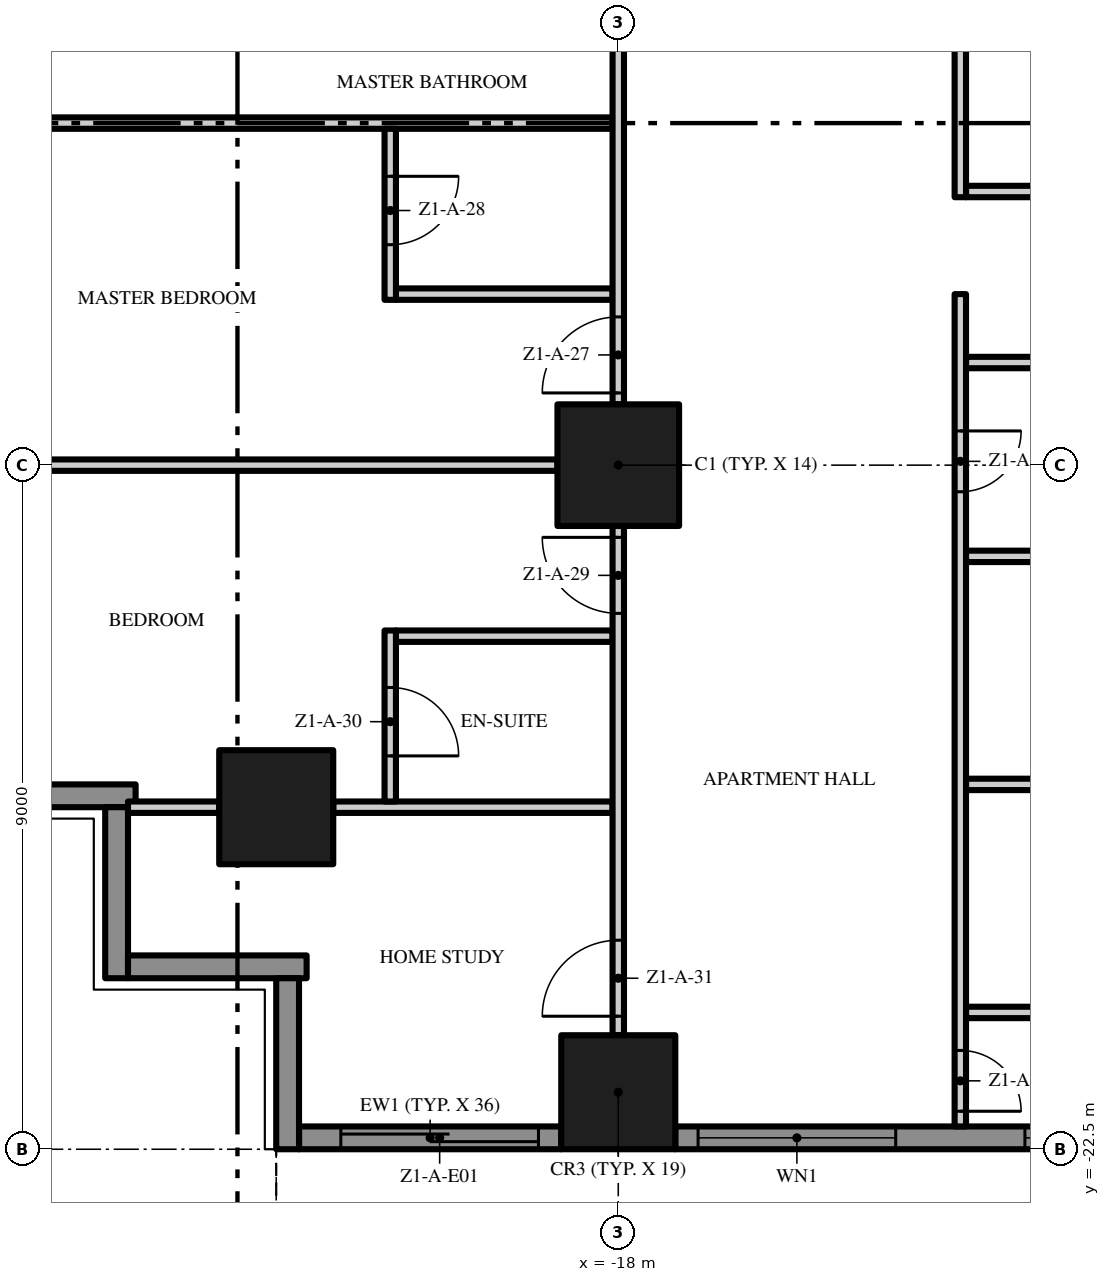
"""IFC4 building model, lengths in metres.
Left out: names, types, materials, properties, quantities, classifications, styles, units other than length and angle.
Written with IfcOpenShell. Run it as: python <this file> out.ifc"""

import sys

from ifc_helpers import new_model, si_unit, direction, frame, frame_2d, origin, origin_2d, place, context, subcontext, project, spatial, polyline, rectangle, outline, extrude, element, fill, save


model = new_model("IFC4")
c1 = context("Model", 3, precision=1e-05, world=origin(), true_north=direction((0.0, 1.0)))
c2 = subcontext(c1, "Body", "Model", "MODEL_VIEW")
j1 = project(units=[si_unit("LENGTHUNIT", "METRE"), si_unit("PLANEANGLEUNIT", "RADIAN")], contexts=[c1])
p1 = place(None, origin())
s1 = spatial("IfcSite", under=j1, at=p1, CompositionType="ELEMENT")
p2 = place(p1, origin())
s2 = spatial("IfcBuilding", under=s1, at=p2, CompositionType="ELEMENT")
p3 = place(p2, frame((0.0, 0.0, 15.0)))
s3 = spatial("IfcBuildingStorey", under=s2, at=p3, CompositionType="ELEMENT", Elevation=15.0)
p4 = place(p3, frame((-18.0, -13.5, 0.0), z_axis=(0.0, 0.0, 1.0), x_axis=(1.0, 0.0, 0.0)))
e1 = element("IfcColumn", 1, at=p4, inside=s3, PredefinedType="COLUMN", context=c2, shape_type="SweptSolid", body=[
    extrude(rectangle(XDim=1.6, YDim=1.6, at=origin_2d()), origin(), (0.0, 0.0, 1.0), 3.5),
])
for number, where, z_axis, x_axis in (
    (2, (-18.0, -21.75, 0.0), (0.0, 0.0, 1.0), (1.0, 0.0, 0.0)),
    (3, (-22.5, -18.0, 0.0), (0.0, 0.0, 1.0), (1.0, 0.0, 0.0)),
):
    element("IfcColumn", number, at=place(p3, frame(where, z_axis=z_axis, x_axis=x_axis)), inside=s3, PredefinedType="COLUMN", context=c2, shape_type="SweptSolid", body=[
        extrude(rectangle(XDim=1.5, YDim=1.5, at=origin_2d()), origin(), (0.0, 0.0, 1.0), 3.5),
    ])
p5 = place(p3, frame((-18.75, -22.35, 0.0), z_axis=(0.0, 0.0, 1.0), x_axis=(-1.0, 0.0, 0.0)))
e4 = element("IfcWall", 4, at=p5, inside=s3, PredefinedType="SOLIDWALL", context=c2, shape_type="SweptSolid", body=[
    extrude(rectangle(XDim=3.45, YDim=0.3, at=frame_2d((1.725, 0.0))), origin(), (0.0, 0.0, 1.0), 3.5),
])
p6 = place(p5, frame((0.3, 0.0, 0.0)))
e5 = element("IfcOpeningElement", 5, at=p6, cuts=e4, PredefinedType="OPENING", context=c2, shape_type="SweptSolid", body=[
    extrude(rectangle(XDim=2.6, YDim=2.4, at=frame_2d((1.3, 1.2))), frame((0.0, 0.16, 0.0), z_axis=(0.0, -1.0, 0.0), x_axis=(1.0, 0.0, 0.0)), (0.0, 0.0, 1.0), 0.32),
])
p7 = place(p3, frame((-9.75, -22.35, 0.0), z_axis=(0.0, 0.0, 1.0), x_axis=(-1.0, 0.0, 0.0)))
e6 = element("IfcWall", 6, at=p7, inside=s3, PredefinedType="SOLIDWALL", context=c2, shape_type="SweptSolid", body=[
    extrude(rectangle(XDim=7.5, YDim=0.3, at=frame_2d((3.75, 0.0))), origin(), (0.0, 0.0, 1.0), 3.5),
])
p8 = place(p7, frame((4.6, 0.0, 0.45)))
e7 = element("IfcOpeningElement", 7, at=p8, cuts=e6, PredefinedType="OPENING", context=c2, shape_type="SweptSolid", body=[
    extrude(rectangle(XDim=2.6, YDim=2.65, at=frame_2d((1.3, 1.325))), frame((0.0, 0.16, 0.0), z_axis=(0.0, -1.0, 0.0), x_axis=(1.0, 0.0, 0.0)), (0.0, 0.0, 1.0), 0.32),
])
p9 = place(p7, frame((0.3, 0.0, 0.45)))
e8 = element("IfcOpeningElement", 8, at=p9, cuts=e6, PredefinedType="OPENING", context=c2, shape_type="SweptSolid", body=[
    extrude(rectangle(XDim=2.6, YDim=2.65, at=frame_2d((1.3, 1.325))), frame((0.0, 0.16, 0.0), z_axis=(0.0, -1.0, 0.0), x_axis=(1.0, 0.0, 0.0)), (0.0, 0.0, 1.0), 0.32),
])
p10 = place(p3, frame((-24.35, -17.85, 0.0), z_axis=(0.0, 0.0, 1.0), x_axis=(-1.0, 0.0, 0.0)))
e9 = element("IfcWall", 9, at=p10, inside=s3, PredefinedType="SOLIDWALL", context=c2, shape_type="SweptSolid", body=[
    extrude(rectangle(XDim=2.35, YDim=0.3, at=frame_2d((1.175, 0.0))), origin(), (0.0, 0.0, 1.0), 3.5),
])
p11 = place(p3, frame((-24.6, -20.25, 0.0), z_axis=(0.0, 0.0, 1.0), x_axis=(0.0, 1.0, 0.0)))
e10 = element("IfcWall", 10, at=p11, inside=s3, PredefinedType="SOLIDWALL", context=c2, shape_type="SweptSolid", body=[
    extrude(rectangle(XDim=2.25, YDim=0.3, at=frame_2d((1.125, 0.0))), origin(), (0.0, 0.0, 1.0), 3.5),
])
p12 = place(p3, frame((-22.1, -20.1, 0.0), z_axis=(0.0, 0.0, 1.0), x_axis=(-1.0, 0.0, 0.0)))
e11 = element("IfcWall", 11, at=p12, inside=s3, PredefinedType="SOLIDWALL", context=c2, shape_type="SweptSolid", body=[
    extrude(rectangle(XDim=2.35, YDim=0.3, at=frame_2d((1.175, 0.0))), origin(), (0.0, 0.0, 1.0), 3.5),
])
p13 = place(p3, frame((-22.35, -22.5, 0.0), z_axis=(0.0, 0.0, 1.0), x_axis=(0.0, 1.0, 0.0)))
e12 = element("IfcWall", 12, at=p13, inside=s3, PredefinedType="SOLIDWALL", context=c2, shape_type="SweptSolid", body=[
    extrude(rectangle(XDim=2.25, YDim=0.3, at=frame_2d((1.125, 0.0))), origin(), (0.0, 0.0, 1.0), 3.5),
])
p14 = place(p3, origin())
e13 = element("IfcWall", 13, at=p14, inside=s3, PredefinedType="USERDEFINED", context=c2, shape_type="SweptSolid", body=[
    extrude(outline(polyline([(-22.5, -24.3), (-21.0, -25.005), (-19.5, -25.441), (-18.75, -25.5), (-18.0, -25.441), (-16.5, -25.005), (-15.0, -24.3), (-13.5, -23.595), (-12.0, -23.159), (-11.25, -23.1), (-10.5, -23.159), (-9.0, -23.595), (-7.5, -24.3), (-6.0, -25.005), (-4.5, -25.441), (-3.75, -25.5), (-3.0, -25.441), (-1.5, -25.005), (0.0, -24.3), (1.5, -23.595), (3.0, -23.159), (3.75, -23.1), (4.5, -23.159), (6.0, -23.595), (7.5, -24.3), (9.0, -25.005), (10.5, -25.441), (11.25, -25.5), (12.0, -25.441), (13.5, -25.005), (15.0, -24.3), (16.5, -23.595), (18.0, -23.159), (18.75, -23.1), (19.5, -23.159), (21.0, -23.595), (22.5, -24.3), (22.606, -24.074), (21.089, -23.36), (19.545, -22.911), (18.75, -22.849), (17.955, -22.911), (16.411, -23.36), (14.894, -24.074), (13.411, -24.771), (11.955, -25.194), (11.25, -25.249), (10.545, -25.194), (9.089, -24.771), (7.606, -24.074), (6.089, -23.36), (4.545, -22.911), (3.75, -22.849), (2.955, -22.911), (1.411, -23.36), (-0.106, -24.074), (-1.589, -24.771), (-3.045, -25.194), (-3.75, -25.249), (-4.455, -25.194), (-5.911, -24.771), (-7.394, -24.074), (-8.911, -23.36), (-10.455, -22.911), (-11.25, -22.849), (-12.045, -22.911), (-13.589, -23.36), (-15.106, -24.074), (-16.589, -24.771), (-18.045, -25.194), (-18.75, -25.249), (-19.455, -25.194), (-20.911, -24.771), (-22.394, -24.074), (-22.5, -24.3)])), origin(), (0.0, 0.0, 1.0), 0.9),
])
p15 = place(p3, frame((-13.425, -20.7, 0.0), z_axis=(0.0, 0.0, 1.0), x_axis=(1.0, 0.0, 0.0)))
e14 = element("IfcWall", 14, at=p15, inside=s3, PredefinedType="PARTITIONING", context=c2, shape_type="SweptSolid", body=[
    extrude(rectangle(XDim=4.35, YDim=0.15, at=frame_2d((2.175, 0.0))), origin(), (0.0, 0.0, 1.0), 3.5),
])
p16 = place(p3, frame((-24.45, -18.0, 0.0), z_axis=(0.0, 0.0, 1.0), x_axis=(1.0, 0.0, 0.0)))
e15 = element("IfcWall", 15, at=p16, inside=s3, PredefinedType="PARTITIONING", context=c2, shape_type="SweptSolid", body=[
    extrude(rectangle(XDim=1.2, YDim=0.15, at=frame_2d((0.6, 0.0))), origin(), (0.0, 0.0, 1.0), 3.5),
])
p17 = place(p3, frame((-21.75, -18.0, 0.0), z_axis=(0.0, 0.0, 1.0), x_axis=(1.0, 0.0, 0.0)))
e16 = element("IfcWall", 16, at=p17, inside=s3, PredefinedType="PARTITIONING", context=c2, shape_type="SweptSolid", body=[
    extrude(rectangle(XDim=3.675, YDim=0.15, at=frame_2d((1.837, 0.0))), origin(), (0.0, 0.0, 1.0), 3.5),
])
p18 = place(p3, frame((-13.425, -17.7, 0.0), z_axis=(0.0, 0.0, 1.0), x_axis=(1.0, 0.0, 0.0)))
e17 = element("IfcWall", 17, at=p18, inside=s3, PredefinedType="PARTITIONING", context=c2, shape_type="SweptSolid", body=[
    extrude(rectangle(XDim=4.35, YDim=0.15, at=frame_2d((2.175, 0.0))), origin(), (0.0, 0.0, 1.0), 3.5),
])
p19 = place(p3, frame((-20.925, -15.75, 0.0), z_axis=(0.0, 0.0, 1.0), x_axis=(1.0, 0.0, 0.0)))
e18 = element("IfcWall", 18, at=p19, inside=s3, PredefinedType="PARTITIONING", context=c2, shape_type="SweptSolid", body=[
    extrude(rectangle(XDim=2.85, YDim=0.15, at=frame_2d((1.425, 0.0))), origin(), (0.0, 0.0, 1.0), 3.5),
])
p20 = place(p3, frame((-13.425, -14.7, 0.0), z_axis=(0.0, 0.0, 1.0), x_axis=(1.0, 0.0, 0.0)))
e19 = element("IfcWall", 19, at=p20, inside=s3, PredefinedType="PARTITIONING", context=c2, shape_type="SweptSolid", body=[
    extrude(rectangle(XDim=4.35, YDim=0.15, at=frame_2d((2.175, 0.0))), origin(), (0.0, 0.0, 1.0), 3.5),
])
p21 = place(p3, frame((-25.5, -13.5, 0.0), z_axis=(0.0, 0.0, 1.0), x_axis=(1.0, 0.0, 0.0)))
e20 = element("IfcWall", 20, at=p21, inside=s3, PredefinedType="PARTITIONING", context=c2, shape_type="SweptSolid", body=[
    extrude(rectangle(XDim=6.7, YDim=0.15, at=frame_2d((3.35, 0.0))), origin(), (0.0, 0.0, 1.0), 3.5),
])
p22 = place(p3, frame((-13.425, -12.15, 0.0), z_axis=(0.0, 0.0, 1.0), x_axis=(1.0, 0.0, 0.0)))
e21 = element("IfcWall", 21, at=p22, inside=s3, PredefinedType="PARTITIONING", context=c2, shape_type="SweptSolid", body=[
    extrude(rectangle(XDim=4.35, YDim=0.15, at=frame_2d((2.175, 0.0))), origin(), (0.0, 0.0, 1.0), 3.5),
])
p23 = place(p3, frame((-20.925, -11.25, 0.0), z_axis=(0.0, 0.0, 1.0), x_axis=(1.0, 0.0, 0.0)))
e22 = element("IfcWall", 22, at=p23, inside=s3, PredefinedType="PARTITIONING", context=c2, shape_type="SweptSolid", body=[
    extrude(rectangle(XDim=2.85, YDim=0.15, at=frame_2d((1.425, 0.0))), origin(), (0.0, 0.0, 1.0), 3.5),
])
p24 = place(p3, frame((-13.425, -9.9, 0.0), z_axis=(0.0, 0.0, 1.0), x_axis=(1.0, 0.0, 0.0)))
e23 = element("IfcWall", 23, at=p24, inside=s3, PredefinedType="PARTITIONING", context=c2, shape_type="SweptSolid", body=[
    extrude(rectangle(XDim=4.35, YDim=0.15, at=frame_2d((2.175, 0.0))), origin(), (0.0, 0.0, 1.0), 3.5),
])
p25 = place(p24, frame((1.75, 0.0, 0.0)))
e24 = element("IfcOpeningElement", 24, at=p25, cuts=e23, PredefinedType="OPENING", context=c2, shape_type="SweptSolid", body=[
    extrude(rectangle(XDim=0.9, YDim=2.1, at=frame_2d((0.45, 1.05))), frame((0.0, 0.085, 0.0), z_axis=(0.0, -1.0, 0.0), x_axis=(1.0, 0.0, 0.0)), (0.0, 0.0, 1.0), 0.17),
])
p26 = place(p3, frame((-26.7, -9.0, 0.0), z_axis=(0.0, 0.0, 1.0), x_axis=(1.0, 0.0, 0.0)))
e25 = element("IfcWall", 25, at=p26, inside=s3, PredefinedType="PARTITIONING", context=c2, shape_type="SweptSolid", body=[
    extrude(rectangle(XDim=8.625, YDim=0.15, at=frame_2d((4.312, 0.0))), origin(), (0.0, 0.0, 1.0), 3.5),
])
p27 = place(p3, frame((-21.0, -15.675, 0.0), z_axis=(0.0, 0.0, 1.0), x_axis=(0.0, -1.0, 0.0)))
e26 = element("IfcWall", 26, at=p27, inside=s3, PredefinedType="PARTITIONING", context=c2, shape_type="SweptSolid", body=[
    extrude(rectangle(XDim=2.25, YDim=0.15, at=frame_2d((1.125, 0.0))), origin(), (0.0, 0.0, 1.0), 3.5),
])
p28 = place(p27, frame((0.75, 0.0, 0.0)))
e27 = element("IfcOpeningElement", 27, at=p28, cuts=e26, PredefinedType="OPENING", context=c2, shape_type="SweptSolid", body=[
    extrude(rectangle(XDim=0.9, YDim=2.1, at=frame_2d((0.45, 1.05))), frame((0.0, 0.085, 0.0), z_axis=(0.0, -1.0, 0.0), x_axis=(1.0, 0.0, 0.0)), (0.0, 0.0, 1.0), 0.17),
])
p29 = place(p3, frame((-21.0, -9.075, 0.0), z_axis=(0.0, 0.0, 1.0), x_axis=(0.0, -1.0, 0.0)))
e28 = element("IfcWall", 28, at=p29, inside=s3, PredefinedType="PARTITIONING", context=c2, shape_type="SweptSolid", body=[
    extrude(rectangle(XDim=2.25, YDim=0.15, at=frame_2d((1.125, 0.0))), origin(), (0.0, 0.0, 1.0), 3.5),
])
p30 = place(p29, frame((0.625, 0.0, 0.0)))
e29 = element("IfcOpeningElement", 29, at=p30, cuts=e28, PredefinedType="OPENING", context=c2, shape_type="SweptSolid", body=[
    extrude(rectangle(XDim=0.9, YDim=2.1, at=frame_2d((0.45, 1.05))), frame((0.0, 0.085, 0.0), z_axis=(0.0, -1.0, 0.0), x_axis=(1.0, 0.0, 0.0)), (0.0, 0.0, 1.0), 0.17),
])
p31 = place(p3, frame((-18.0, -21.0, 0.0), z_axis=(0.0, 0.0, 1.0), x_axis=(0.0, 1.0, 0.0)))
e30 = element("IfcWall", 30, at=p31, inside=s3, PredefinedType="PARTITIONING", context=c2, shape_type="SweptSolid", body=[
    extrude(rectangle(XDim=6.7, YDim=0.15, at=frame_2d((3.35, 0.0))), origin(), (0.0, 0.0, 1.0), 3.5),
])
p32 = place(p31, frame((5.55, 0.0, 0.0)))
e31 = element("IfcOpeningElement", 31, at=p32, cuts=e30, PredefinedType="OPENING", context=c2, shape_type="SweptSolid", body=[
    extrude(rectangle(XDim=1.0, YDim=2.4, at=frame_2d((0.5, 1.2))), frame((0.0, 0.085, 0.0), z_axis=(0.0, -1.0, 0.0), x_axis=(1.0, 0.0, 0.0)), (0.0, 0.0, 1.0), 0.17),
])
p33 = place(p31, frame((0.25, 0.0, 0.0)))
e32 = element("IfcOpeningElement", 32, at=p33, cuts=e30, PredefinedType="OPENING", context=c2, shape_type="SweptSolid", body=[
    extrude(rectangle(XDim=1.0, YDim=2.4, at=frame_2d((0.5, 1.2))), frame((0.0, 0.085, 0.0), z_axis=(0.0, -1.0, 0.0), x_axis=(1.0, 0.0, 0.0)), (0.0, 0.0, 1.0), 0.17),
])
p34 = place(p3, frame((-18.0, -12.7, 0.0), z_axis=(0.0, 0.0, 1.0), x_axis=(0.0, 1.0, 0.0)))
e33 = element("IfcWall", 33, at=p34, inside=s3, PredefinedType="PARTITIONING", context=c2, shape_type="SweptSolid", body=[
    extrude(rectangle(XDim=7.4, YDim=0.15, at=frame_2d((3.7, 0.0))), origin(), (0.0, 0.0, 1.0), 3.5),
])
p35 = place(p34, frame((5.45, 0.0, 0.0)))
e34 = element("IfcOpeningElement", 34, at=p35, cuts=e33, PredefinedType="OPENING", context=c2, shape_type="SweptSolid", body=[
    extrude(rectangle(XDim=1.8, YDim=2.4, at=frame_2d((0.9, 1.2))), frame((0.0, 0.085, 0.0), z_axis=(0.0, -1.0, 0.0), x_axis=(1.0, 0.0, 0.0)), (0.0, 0.0, 1.0), 0.17),
])
p36 = place(p34, frame((0.15, 0.0, 0.0)))
e35 = element("IfcOpeningElement", 35, at=p36, cuts=e33, PredefinedType="OPENING", context=c2, shape_type="SweptSolid", body=[
    extrude(rectangle(XDim=1.0, YDim=2.4, at=frame_2d((0.5, 1.2))), frame((0.0, 0.085, 0.0), z_axis=(0.0, -1.0, 0.0), x_axis=(1.0, 0.0, 0.0)), (0.0, 0.0, 1.0), 0.17),
])
p37 = place(p3, frame((-13.5, -11.25, 0.0), z_axis=(0.0, 0.0, 1.0), x_axis=(0.0, -1.0, 0.0)))
e36 = element("IfcWall", 36, at=p37, inside=s3, PredefinedType="PARTITIONING", context=c2, shape_type="SweptSolid", body=[
    extrude(rectangle(XDim=10.95, YDim=0.15, at=frame_2d((5.475, 0.0))), origin(), (0.0, 0.0, 1.0), 3.5),
])
p38 = place(p37, frame((1.8, 0.0, 0.0)))
e37 = element("IfcOpeningElement", 37, at=p38, cuts=e36, PredefinedType="OPENING", context=c2, shape_type="SweptSolid", body=[
    extrude(rectangle(XDim=0.8, YDim=2.0, at=frame_2d((0.4, 1.0))), frame((0.0, 0.085, 0.0), z_axis=(0.0, -1.0, 0.0), x_axis=(1.0, 0.0, 0.0)), (0.0, 0.0, 1.0), 0.17),
])
p39 = place(p37, frame((9.95, 0.0, 0.0)))
e38 = element("IfcOpeningElement", 38, at=p39, cuts=e36, PredefinedType="OPENING", context=c2, shape_type="SweptSolid", body=[
    extrude(rectangle(XDim=0.8, YDim=2.0, at=frame_2d((0.4, 1.0))), frame((0.0, 0.085, 0.0), z_axis=(0.0, -1.0, 0.0), x_axis=(1.0, 0.0, 0.0)), (0.0, 0.0, 1.0), 0.17),
])
p40 = place(p3, frame((-13.5, -9.975, 0.0), z_axis=(0.0, 0.0, 1.0), x_axis=(0.0, 1.0, 0.0)))
e39 = element("IfcWall", 39, at=p40, inside=s3, PredefinedType="PARTITIONING", context=c2, shape_type="SweptSolid", body=[
    extrude(rectangle(XDim=9.875, YDim=0.15, at=frame_2d((4.938, 0.0))), origin(), (0.0, 0.0, 1.0), 3.5),
])
p41 = place(p6, origin())
e40 = element("IfcDoor", 40, at=p41, inside=s3, OperationType="SINGLE_SWING_LEFT", PredefinedType="DOOR", context=c2, shape_type="SweptSolid", body=[
    extrude(rectangle(XDim=2.6, YDim=2.4, at=frame_2d((1.3, 1.2))), frame((0.0, 0.025, 0.0), z_axis=(0.0, -1.0, 0.0), x_axis=(1.0, 0.0, 0.0)), (0.0, 0.0, 1.0), 0.05),
])
fill(e5, e40)
p42 = place(p8, origin())
e41 = element("IfcWindow", 41, at=p42, inside=s3, PartitioningType="SINGLE_PANEL", PredefinedType="WINDOW", context=c2, shape_type="SweptSolid", body=[
    extrude(rectangle(XDim=2.6, YDim=2.65, at=frame_2d((1.3, 1.325))), frame((0.0, 0.03, 0.0), z_axis=(0.0, -1.0, 0.0), x_axis=(1.0, 0.0, 0.0)), (0.0, 0.0, 1.0), 0.06),
])
fill(e7, e41)
p43 = place(p9, origin())
e42 = element("IfcWindow", 42, at=p43, inside=s3, PartitioningType="SINGLE_PANEL", PredefinedType="WINDOW", context=c2, shape_type="SweptSolid", body=[
    extrude(rectangle(XDim=2.6, YDim=2.65, at=frame_2d((1.3, 1.325))), frame((0.0, 0.03, 0.0), z_axis=(0.0, -1.0, 0.0), x_axis=(1.0, 0.0, 0.0)), (0.0, 0.0, 1.0), 0.06),
])
fill(e8, e42)
p44 = place(p38, origin())
e43 = element("IfcDoor", 43, at=p44, inside=s3, OperationType="SINGLE_SWING_LEFT", PredefinedType="DOOR", context=c2, shape_type="SweptSolid", body=[
    extrude(rectangle(XDim=0.8, YDim=2.0, at=frame_2d((0.4, 1.0))), frame((0.0, 0.025, 0.0), z_axis=(0.0, -1.0, 0.0), x_axis=(1.0, 0.0, 0.0)), (0.0, 0.0, 1.0), 0.05),
])
fill(e37, e43)
p45 = place(p39, origin())
e44 = element("IfcDoor", 44, at=p45, inside=s3, OperationType="SINGLE_SWING_RIGHT", PredefinedType="DOOR", context=c2, shape_type="SweptSolid", body=[
    extrude(rectangle(XDim=0.8, YDim=2.0, at=frame_2d((0.4, 1.0))), frame((0.0, 0.025, 0.0), z_axis=(0.0, -1.0, 0.0), x_axis=(1.0, 0.0, 0.0)), (0.0, 0.0, 1.0), 0.05),
])
fill(e38, e44)
p46 = place(p36, origin())
e45 = element("IfcDoor", 45, at=p46, inside=s3, OperationType="SINGLE_SWING_LEFT", PredefinedType="DOOR", context=c2, shape_type="SweptSolid", body=[
    extrude(rectangle(XDim=1.0, YDim=2.4, at=frame_2d((0.5, 1.2))), frame((0.0, 0.025, 0.0), z_axis=(0.0, -1.0, 0.0), x_axis=(1.0, 0.0, 0.0)), (0.0, 0.0, 1.0), 0.05),
])
fill(e35, e45)
p47 = place(p30, origin())
e46 = element("IfcDoor", 46, at=p47, inside=s3, OperationType="SINGLE_SWING_LEFT", PredefinedType="DOOR", context=c2, shape_type="SweptSolid", body=[
    extrude(rectangle(XDim=0.9, YDim=2.1, at=frame_2d((0.45, 1.05))), frame((0.0, 0.025, 0.0), z_axis=(0.0, -1.0, 0.0), x_axis=(1.0, 0.0, 0.0)), (0.0, 0.0, 1.0), 0.05),
])
fill(e29, e46)
p48 = place(p32, origin())
e47 = element("IfcDoor", 47, at=p48, inside=s3, OperationType="SINGLE_SWING_RIGHT", PredefinedType="DOOR", context=c2, shape_type="SweptSolid", body=[
    extrude(rectangle(XDim=1.0, YDim=2.4, at=frame_2d((0.5, 1.2))), frame((0.0, 0.025, 0.0), z_axis=(0.0, -1.0, 0.0), x_axis=(1.0, 0.0, 0.0)), (0.0, 0.0, 1.0), 0.05),
])
fill(e31, e47)
p49 = place(p28, origin())
e48 = element("IfcDoor", 48, at=p49, inside=s3, OperationType="SINGLE_SWING_RIGHT", PredefinedType="DOOR", context=c2, shape_type="SweptSolid", body=[
    extrude(rectangle(XDim=0.9, YDim=2.1, at=frame_2d((0.45, 1.05))), frame((0.0, 0.025, 0.0), z_axis=(0.0, -1.0, 0.0), x_axis=(1.0, 0.0, 0.0)), (0.0, 0.0, 1.0), 0.05),
])
fill(e27, e48)
p50 = place(p33, origin())
e49 = element("IfcDoor", 49, at=p50, inside=s3, OperationType="SINGLE_SWING_LEFT", PredefinedType="DOOR", context=c2, shape_type="SweptSolid", body=[
    extrude(rectangle(XDim=1.0, YDim=2.4, at=frame_2d((0.5, 1.2))), frame((0.0, 0.025, 0.0), z_axis=(0.0, -1.0, 0.0), x_axis=(1.0, 0.0, 0.0)), (0.0, 0.0, 1.0), 0.05),
])
fill(e32, e49)
save(model, sys.argv[1])
